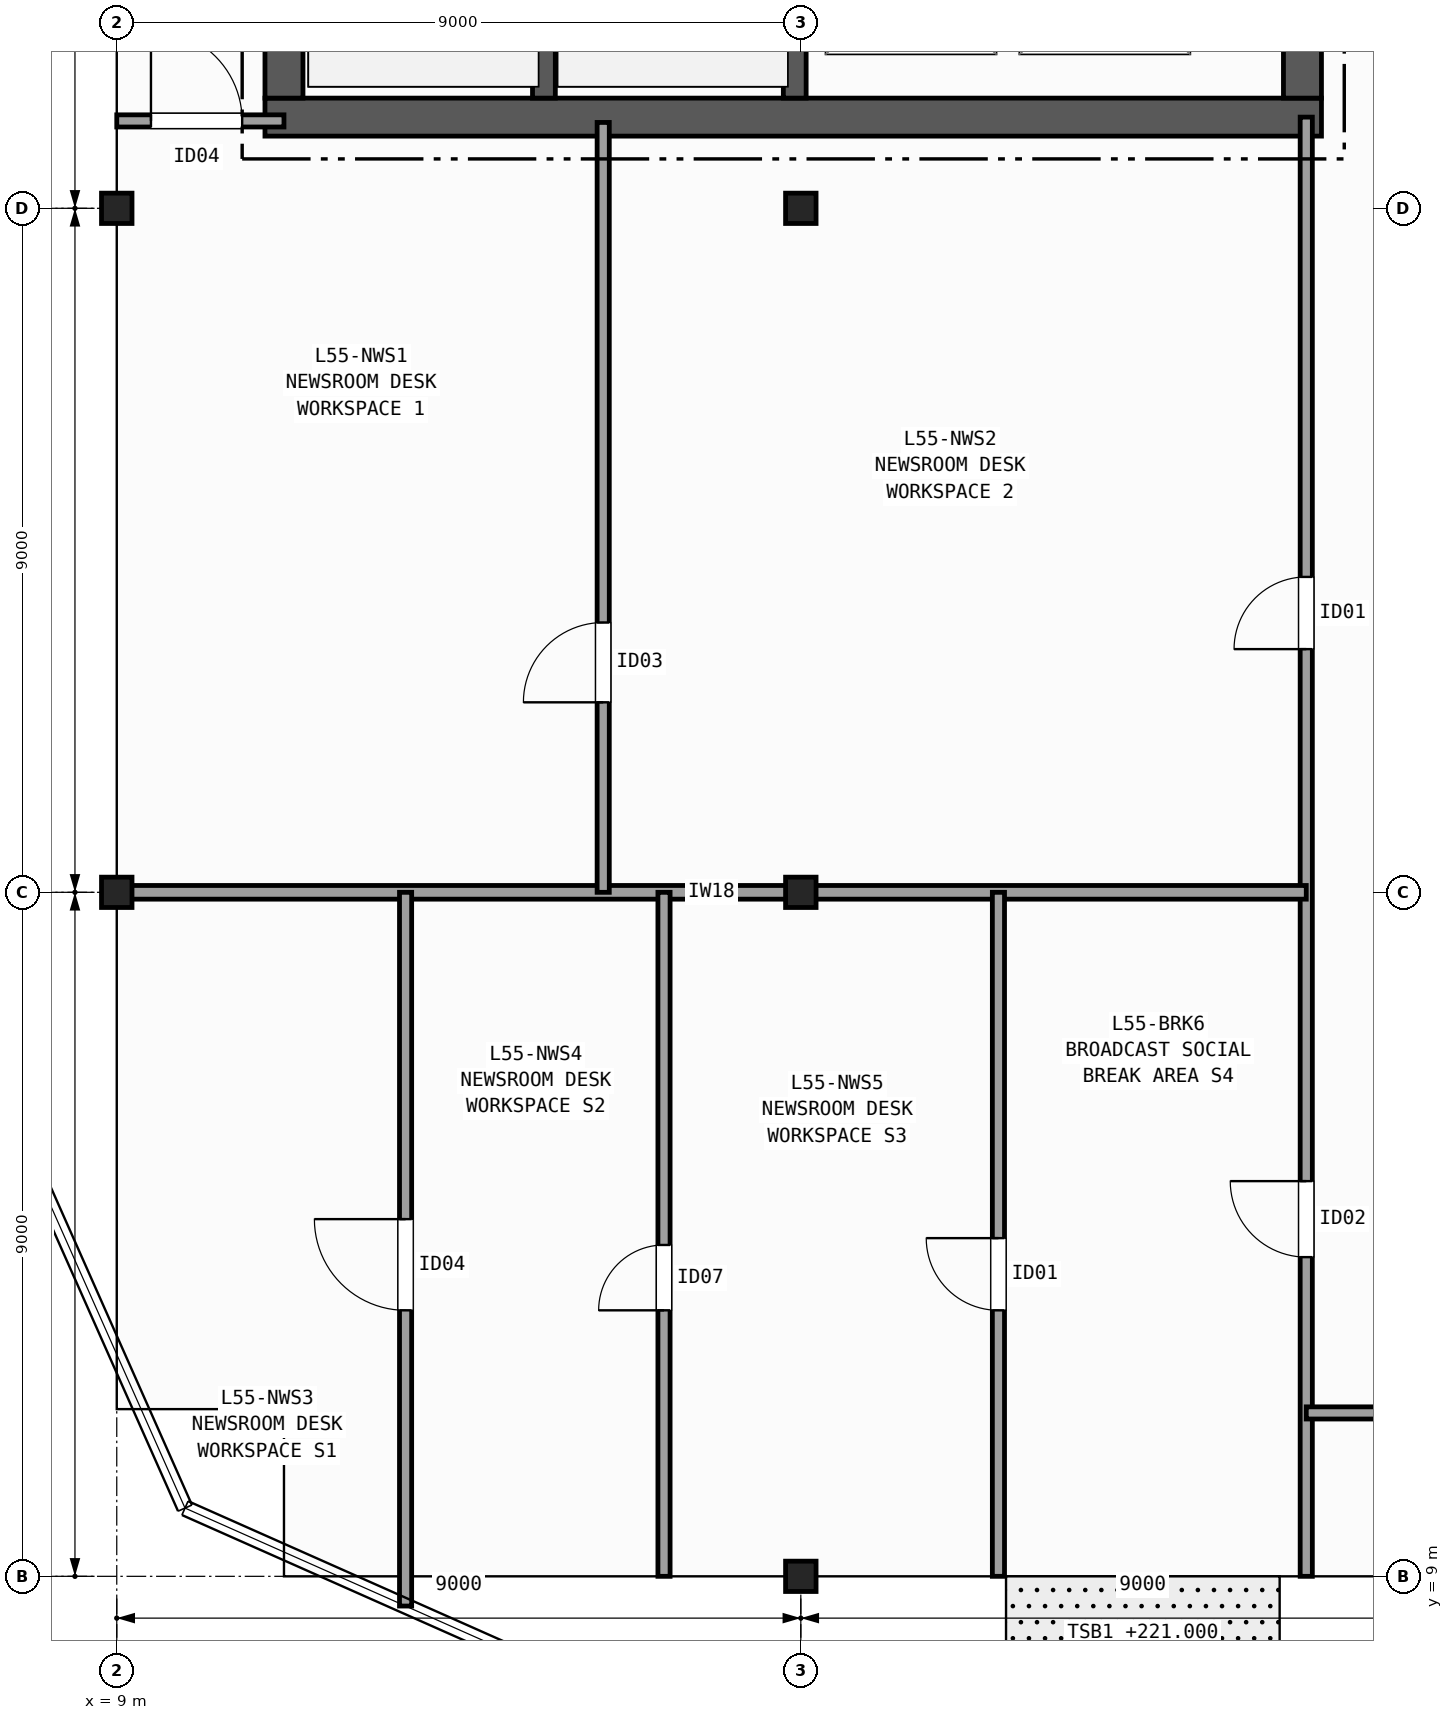
"""IFC4 building model, lengths in metres.
Left out: names, types, materials, properties, quantities, classifications, styles, units other than length and angle.
Written with IfcOpenShell. Run it as: python <this file> out.ifc"""

import sys

from ifc_helpers import new_model, si_unit, direction, frame, frame_2d, origin, origin_2d, place, context, subcontext, project, spatial, rectangle, i_section, extrude, element, fill, save


model = new_model("IFC4")
c1 = context("Model", 3, precision=1e-05, world=origin(), true_north=direction((0.0, 1.0)))
c2 = subcontext(c1, "Body", "Model", "MODEL_VIEW")
j1 = project(units=[si_unit("LENGTHUNIT", "METRE"), si_unit("PLANEANGLEUNIT", "RADIAN")], contexts=[c1])
p1 = place(None, origin())
s1 = spatial("IfcSite", under=j1, at=p1, CompositionType="ELEMENT")
p2 = place(p1, origin())
s2 = spatial("IfcBuilding", under=s1, at=p2, CompositionType="ELEMENT")
p3 = place(p2, frame((0.0, 0.0, 221.0)))
s3 = spatial("IfcBuildingStorey", under=s2, at=p3, CompositionType="ELEMENT", Elevation=221.0)
for number, where, z_axis, x_axis in (
    (1, (9.0, 18.0, 0.0), (0.0, 0.0, 1.0), (1.0, 0.0, 0.0)),
    (2, (9.0, 27.0, 0.0), (0.0, 0.0, 1.0), (1.0, 0.0, 0.0)),
    (3, (18.0, 9.0, 0.0), (0.0, 0.0, 1.0), (1.0, 0.0, 0.0)),
    (4, (18.0, 18.0, 0.0), (0.0, 0.0, 1.0), (1.0, 0.0, 0.0)),
    (5, (18.0, 27.0, 0.0), (0.0, 0.0, 1.0), (1.0, 0.0, 0.0)),
):
    element("IfcColumn", number, at=place(p3, frame(where, z_axis=z_axis, x_axis=x_axis)), inside=s3, PredefinedType="COLUMN", context=c2, shape_type="SweptSolid", body=[
        extrude(i_section(OverallWidth=0.401, OverallDepth=0.399, WebThickness=0.025, FlangeThickness=0.04, FilletRadius=0.015, at=origin_2d()), origin(), (0.0, 0.0, 1.0), 3.7),
    ])
p4 = place(p3, frame((10.95, 28.2, 0.0), z_axis=(0.0, 0.0, 1.0), x_axis=(1.0, 0.0, 0.0)))
e6 = element("IfcWall", 6, at=p4, inside=s3, PredefinedType="SHEAR", context=c2, shape_type="SweptSolid", body=[
    extrude(rectangle(XDim=13.9, YDim=0.5, at=frame_2d((6.95, 0.0))), origin(), (0.0, 0.0, 1.0), 3.42),
])
p5 = place(p3, frame((11.2, 42.15, 0.0), z_axis=(0.0, 0.0, 1.0), x_axis=(0.0, -1.0, 0.0)))
e7 = element("IfcWall", 7, at=p5, inside=s3, PredefinedType="SHEAR", context=c2, shape_type="SweptSolid", body=[
    extrude(rectangle(XDim=13.7, YDim=0.5, at=frame_2d((6.85, 0.0))), origin(), (0.0, 0.0, 1.0), 3.42),
])
p6 = place(p3, frame((24.6, 28.45, 0.0), z_axis=(0.0, 0.0, 1.0), x_axis=(0.0, 1.0, 0.0)))
e8 = element("IfcWall", 8, at=p6, inside=s3, PredefinedType="SHEAR", context=c2, shape_type="SweptSolid", body=[
    extrude(rectangle(XDim=13.7, YDim=0.5, at=frame_2d((6.85, 0.0))), origin(), (0.0, 0.0, 1.0), 3.42),
])
p7 = place(p6, frame((3.35, 0.0, 0.0)))
e9 = element("IfcOpeningElement", 9, at=p7, cuts=e8, PredefinedType="OPENING", context=c2, shape_type="SweptSolid", body=[
    extrude(rectangle(XDim=1.5, YDim=2.2, at=frame_2d((0.75, 1.1))), frame((0.0, 0.26, 0.0), z_axis=(0.0, -1.0, 0.0), x_axis=(1.0, 0.0, 0.0)), (0.0, 0.0, 1.0), 0.52),
])
p8 = place(p6, frame((9.95, 0.0, 0.0)))
e10 = element("IfcOpeningElement", 10, at=p8, cuts=e8, PredefinedType="OPENING", context=c2, shape_type="SweptSolid", body=[
    extrude(rectangle(XDim=0.9, YDim=2.1, at=frame_2d((0.45, 1.05))), frame((0.0, 0.26, 0.0), z_axis=(0.0, -1.0, 0.0), x_axis=(1.0, 0.0, 0.0)), (0.0, 0.0, 1.0), 0.52),
])
p9 = place(p6, frame((12.05, 0.0, 0.0)))
e11 = element("IfcOpeningElement", 11, at=p9, cuts=e8, PredefinedType="OPENING", context=c2, shape_type="SweptSolid", body=[
    extrude(rectangle(XDim=0.9, YDim=2.1, at=frame_2d((0.45, 1.05))), frame((0.0, 0.26, 0.0), z_axis=(0.0, -1.0, 0.0), x_axis=(1.0, 0.0, 0.0)), (0.0, 0.0, 1.0), 0.52),
])
p10 = place(p3, frame((14.62, 28.45, 0.0), z_axis=(0.0, 0.0, 1.0), x_axis=(0.0, 1.0, 0.0)))
e12 = element("IfcWall", 12, at=p10, inside=s3, PredefinedType="SHEAR", context=c2, shape_type="SweptSolid", body=[
    extrude(rectangle(XDim=9.0, YDim=0.3, at=frame_2d((4.5, 0.0))), origin(), (0.0, 0.0, 1.0), 3.42),
])
p11 = place(p3, frame((17.92, 42.15, 0.0), z_axis=(0.0, 0.0, 1.0), x_axis=(0.0, -1.0, 0.0)))
e13 = element("IfcWall", 13, at=p11, inside=s3, PredefinedType="SHEAR", context=c2, shape_type="SweptSolid", body=[
    extrude(rectangle(XDim=13.7, YDim=0.3, at=frame_2d((6.85, 0.0))), origin(), (0.0, 0.0, 1.0), 3.42),
])
p12 = place(p11, frame((1.975, 0.0, 0.0)))
e14 = element("IfcOpeningElement", 14, at=p12, cuts=e13, PredefinedType="OPENING", context=c2, shape_type="SweptSolid", body=[
    extrude(rectangle(XDim=1.15, YDim=2.15, at=frame_2d((0.575, 1.075))), frame((0.0, 0.16, 0.0), z_axis=(0.0, -1.0, 0.0), x_axis=(1.0, 0.0, 0.0)), (0.0, 0.0, 1.0), 0.32),
])
p13 = place(p3, frame((9.0, 28.15, 0.0), z_axis=(0.0, 0.0, 1.0), x_axis=(1.0, 0.0, 0.0)))
e15 = element("IfcWall", 15, at=p13, inside=s3, PredefinedType="PARTITIONING", context=c2, shape_type="SweptSolid", body=[
    extrude(rectangle(XDim=2.2, YDim=0.16, at=frame_2d((1.1, 0.0))), origin(), (0.0, 0.0, 1.0), 2.707),
])
p14 = place(p13, frame((0.45, 0.0, 0.0)))
e16 = element("IfcOpeningElement", 16, at=p14, cuts=e15, PredefinedType="OPENING", context=c2, shape_type="SweptSolid", body=[
    extrude(rectangle(XDim=1.2, YDim=2.15, at=frame_2d((0.6, 1.075))), frame((0.0, 0.09, 0.0), z_axis=(0.0, -1.0, 0.0), x_axis=(1.0, 0.0, 0.0)), (0.0, 0.0, 1.0), 0.18),
])
p15 = place(p3, frame((24.65, 9.0, 0.0), z_axis=(0.0, 0.0, 1.0), x_axis=(0.0, 1.0, 0.0)))
e17 = element("IfcWall", 17, at=p15, inside=s3, PredefinedType="PARTITIONING", context=c2, shape_type="SweptSolid", body=[
    extrude(rectangle(XDim=19.2, YDim=0.16, at=frame_2d((9.6, 0.0))), origin(), (0.0, 0.0, 1.0), 2.707),
])
p16 = place(p15, frame((12.2, 0.0, 0.0)))
e18 = element("IfcOpeningElement", 18, at=p16, cuts=e17, PredefinedType="OPENING", context=c2, shape_type="SweptSolid", body=[
    extrude(rectangle(XDim=0.95, YDim=2.1, at=frame_2d((0.475, 1.05))), frame((0.0, 0.09, 0.0), z_axis=(0.0, -1.0, 0.0), x_axis=(1.0, 0.0, 0.0)), (0.0, 0.0, 1.0), 0.18),
])
p17 = place(p15, frame((4.2, 0.0, 0.0)))
e19 = element("IfcOpeningElement", 19, at=p17, cuts=e17, PredefinedType="OPENING", context=c2, shape_type="SweptSolid", body=[
    extrude(rectangle(XDim=1.0, YDim=2.1, at=frame_2d((0.5, 1.05))), frame((0.0, 0.09, 0.0), z_axis=(0.0, -1.0, 0.0), x_axis=(1.0, 0.0, 0.0)), (0.0, 0.0, 1.0), 0.18),
])
p18 = place(p3, frame((9.0, 18.0, 0.0), z_axis=(0.0, 0.0, 1.0), x_axis=(1.0, 0.0, 0.0)))
e20 = element("IfcWall", 20, at=p18, inside=s3, PredefinedType="PARTITIONING", context=c2, shape_type="SweptSolid", body=[
    extrude(rectangle(XDim=15.65, YDim=0.18, at=frame_2d((7.825, 0.0))), origin(), (0.0, 0.0, 1.0), 2.707),
])
p19 = place(p3, frame((15.4, 18.0, 0.0), z_axis=(0.0, 0.0, 1.0), x_axis=(0.0, 1.0, 0.0)))
e21 = element("IfcWall", 21, at=p19, inside=s3, PredefinedType="PARTITIONING", context=c2, shape_type="SweptSolid", body=[
    extrude(rectangle(XDim=10.13, YDim=0.16, at=frame_2d((5.065, 0.0))), origin(), (0.0, 0.0, 1.0), 2.789),
])
p20 = place(p19, frame((2.5, 0.0, 0.0)))
e22 = element("IfcOpeningElement", 22, at=p20, cuts=e21, PredefinedType="OPENING", context=c2, shape_type="SweptSolid", body=[
    extrude(rectangle(XDim=1.05, YDim=2.15, at=frame_2d((0.525, 1.075))), frame((0.0, 0.09, 0.0), z_axis=(0.0, -1.0, 0.0), x_axis=(1.0, 0.0, 0.0)), (0.0, 0.0, 1.0), 0.18),
])
p21 = place(p3, frame((12.8, 8.609, 0.0), z_axis=(0.0, 0.0, 1.0), x_axis=(0.0, 1.0, 0.0)))
e23 = element("IfcWall", 23, at=p21, inside=s3, PredefinedType="PARTITIONING", context=c2, shape_type="SweptSolid", body=[
    extrude(rectangle(XDim=9.391, YDim=0.16, at=frame_2d((4.696, 0.0))), origin(), (0.0, 0.0, 1.0), 2.789),
])
p22 = place(p21, frame((3.891, 0.0, 0.0)))
e24 = element("IfcOpeningElement", 24, at=p22, cuts=e23, PredefinedType="OPENING", context=c2, shape_type="SweptSolid", body=[
    extrude(rectangle(XDim=1.2, YDim=2.15, at=frame_2d((0.6, 1.075))), frame((0.0, 0.09, 0.0), z_axis=(0.0, -1.0, 0.0), x_axis=(1.0, 0.0, 0.0)), (0.0, 0.0, 1.0), 0.18),
])
p23 = place(p3, frame((16.2, 9.0, 0.0), z_axis=(0.0, 0.0, 1.0), x_axis=(0.0, 1.0, 0.0)))
e25 = element("IfcWall", 25, at=p23, inside=s3, PredefinedType="PARTITIONING", context=c2, shape_type="SweptSolid", body=[
    extrude(rectangle(XDim=9.0, YDim=0.16, at=frame_2d((4.5, 0.0))), origin(), (0.0, 0.0, 1.0), 2.789),
])
p24 = place(p23, frame((3.5, 0.0, 0.0)))
e26 = element("IfcOpeningElement", 26, at=p24, cuts=e25, PredefinedType="OPENING", context=c2, shape_type="SweptSolid", body=[
    extrude(rectangle(XDim=0.86, YDim=2.05, at=frame_2d((0.43, 1.025))), frame((0.0, 0.09, 0.0), z_axis=(0.0, -1.0, 0.0), x_axis=(1.0, 0.0, 0.0)), (0.0, 0.0, 1.0), 0.18),
])
p25 = place(p3, frame((20.6, 9.0, 0.0), z_axis=(0.0, 0.0, 1.0), x_axis=(0.0, 1.0, 0.0)))
e27 = element("IfcWall", 27, at=p25, inside=s3, PredefinedType="PARTITIONING", context=c2, shape_type="SweptSolid", body=[
    extrude(rectangle(XDim=9.0, YDim=0.16, at=frame_2d((4.5, 0.0))), origin(), (0.0, 0.0, 1.0), 2.707),
])
p26 = place(p25, frame((3.5, 0.0, 0.0)))
e28 = element("IfcOpeningElement", 28, at=p26, cuts=e27, PredefinedType="OPENING", context=c2, shape_type="SweptSolid", body=[
    extrude(rectangle(XDim=0.95, YDim=2.1, at=frame_2d((0.475, 1.05))), frame((0.0, 0.09, 0.0), z_axis=(0.0, -1.0, 0.0), x_axis=(1.0, 0.0, 0.0)), (0.0, 0.0, 1.0), 0.18),
])
p27 = place(p3, frame((24.65, 11.15, 0.0), z_axis=(0.0, 0.0, 1.0), x_axis=(1.0, 0.0, 0.0)))
e29 = element("IfcWall", 29, at=p27, inside=s3, PredefinedType="PARTITIONING", context=c2, shape_type="SweptSolid", body=[
    extrude(rectangle(XDim=4.75, YDim=0.16, at=frame_2d((2.375, 0.0))), origin(), (0.0, 0.0, 1.0), 2.792),
])
p28 = place(p27, frame((1.2, 0.0, 0.0)))
e30 = element("IfcOpeningElement", 30, at=p28, cuts=e29, PredefinedType="OPENING", context=c2, shape_type="SweptSolid", body=[
    extrude(rectangle(XDim=1.0, YDim=2.1, at=frame_2d((0.5, 1.05))), frame((0.0, 0.09, 0.0), z_axis=(0.0, -1.0, 0.0), x_axis=(1.0, 0.0, 0.0)), (0.0, 0.0, 1.0), 0.18),
])
p29 = place(p14, origin())
e31 = element("IfcDoor", 31, at=p29, inside=s3, OperationType="SINGLE_SWING_LEFT", PredefinedType="DOOR", context=c2, shape_type="SweptSolid", body=[
    extrude(rectangle(XDim=1.2, YDim=2.15, at=frame_2d((0.6, 1.075))), frame((0.0, 0.025, 0.0), z_axis=(0.0, -1.0, 0.0), x_axis=(1.0, 0.0, 0.0)), (0.0, 0.0, 1.0), 0.05),
])
fill(e16, e31)
p30 = place(p16, origin())
e32 = element("IfcDoor", 32, at=p30, inside=s3, OperationType="SINGLE_SWING_LEFT", PredefinedType="DOOR", context=c2, shape_type="SweptSolid", body=[
    extrude(rectangle(XDim=0.95, YDim=2.1, at=frame_2d((0.475, 1.05))), frame((0.0, 0.025, 0.0), z_axis=(0.0, -1.0, 0.0), x_axis=(1.0, 0.0, 0.0)), (0.0, 0.0, 1.0), 0.05),
])
fill(e18, e32)
p31 = place(p17, origin())
e33 = element("IfcDoor", 33, at=p31, inside=s3, OperationType="SINGLE_SWING_RIGHT", PredefinedType="DOOR", context=c2, shape_type="SweptSolid", body=[
    extrude(rectangle(XDim=1.0, YDim=2.1, at=frame_2d((0.5, 1.05))), frame((0.0, 0.025, 0.0), z_axis=(0.0, -1.0, 0.0), x_axis=(1.0, 0.0, 0.0)), (0.0, 0.0, 1.0), 0.05),
])
fill(e19, e33)
p32 = place(p20, origin())
e34 = element("IfcDoor", 34, at=p32, inside=s3, OperationType="SINGLE_SWING_LEFT", PredefinedType="DOOR", context=c2, shape_type="SweptSolid", body=[
    extrude(rectangle(XDim=1.05, YDim=2.15, at=frame_2d((0.525, 1.075))), frame((0.0, 0.025, 0.0), z_axis=(0.0, -1.0, 0.0), x_axis=(1.0, 0.0, 0.0)), (0.0, 0.0, 1.0), 0.05),
])
fill(e22, e34)
p33 = place(p22, origin())
e35 = element("IfcDoor", 35, at=p33, inside=s3, OperationType="SINGLE_SWING_RIGHT", PredefinedType="DOOR", context=c2, shape_type="SweptSolid", body=[
    extrude(rectangle(XDim=1.2, YDim=2.15, at=frame_2d((0.6, 1.075))), frame((0.0, 0.025, 0.0), z_axis=(0.0, -1.0, 0.0), x_axis=(1.0, 0.0, 0.0)), (0.0, 0.0, 1.0), 0.05),
])
fill(e24, e35)
p34 = place(p24, origin())
e36 = element("IfcDoor", 36, at=p34, inside=s3, OperationType="SINGLE_SWING_LEFT", PredefinedType="DOOR", context=c2, shape_type="SweptSolid", body=[
    extrude(rectangle(XDim=0.86, YDim=2.05, at=frame_2d((0.43, 1.025))), frame((0.0, 0.025, 0.0), z_axis=(0.0, -1.0, 0.0), x_axis=(1.0, 0.0, 0.0)), (0.0, 0.0, 1.0), 0.05),
])
fill(e26, e36)
p35 = place(p26, origin())
e37 = element("IfcDoor", 37, at=p35, inside=s3, OperationType="SINGLE_SWING_RIGHT", PredefinedType="DOOR", context=c2, shape_type="SweptSolid", body=[
    extrude(rectangle(XDim=0.95, YDim=2.1, at=frame_2d((0.475, 1.05))), frame((0.0, 0.025, 0.0), z_axis=(0.0, -1.0, 0.0), x_axis=(1.0, 0.0, 0.0)), (0.0, 0.0, 1.0), 0.05),
])
fill(e28, e37)
save(model, sys.argv[1])
